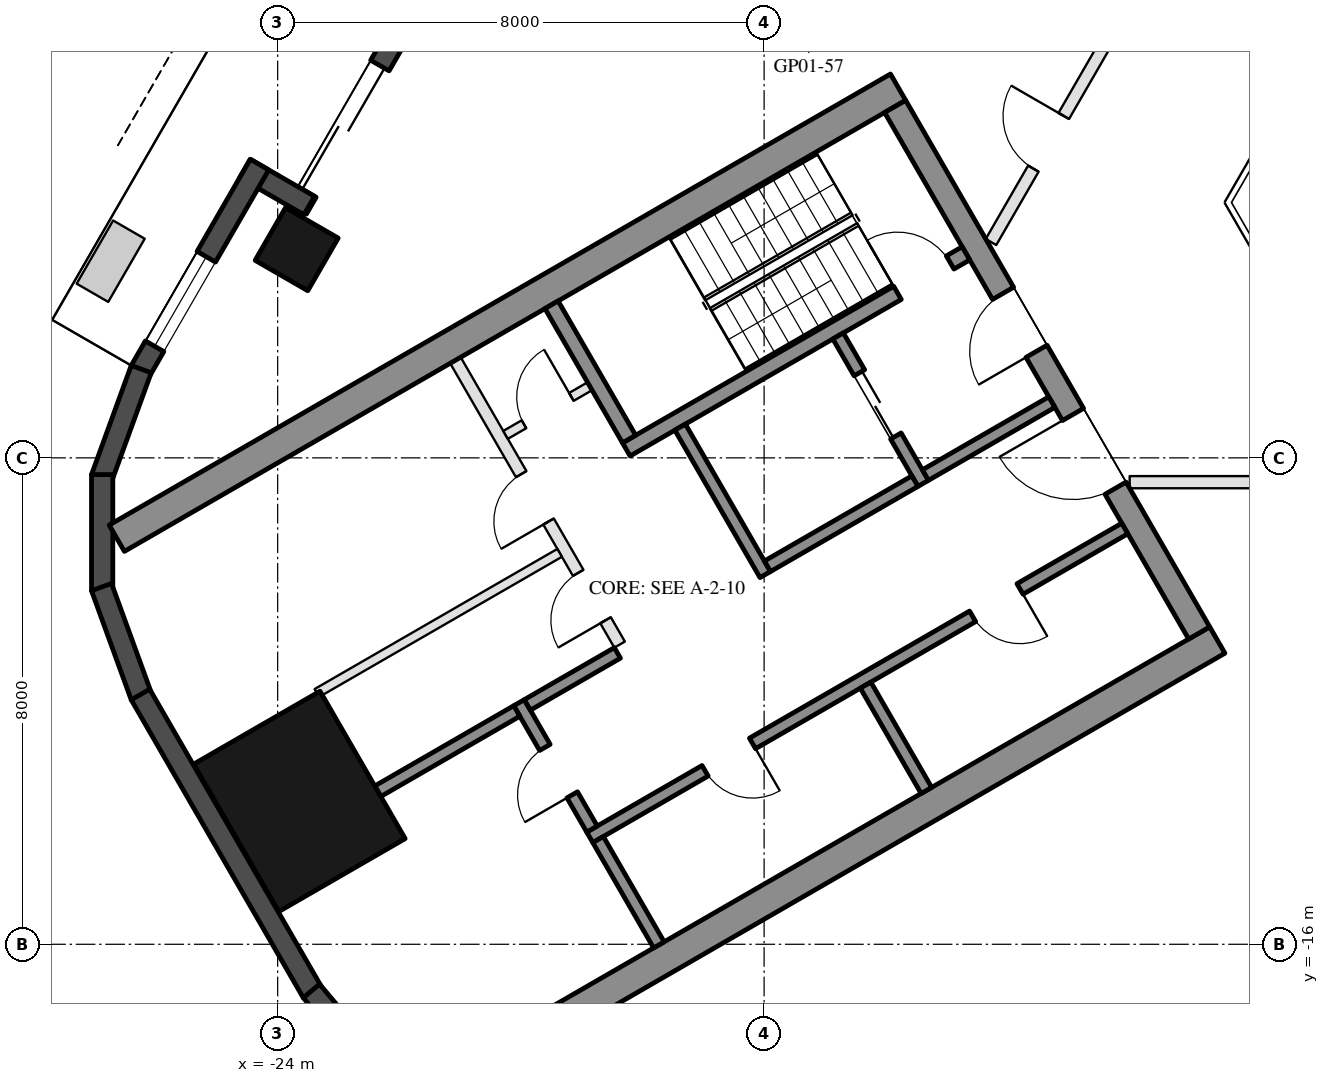
"""IFC4 building model, lengths in metres.
Left out: names, types, materials, properties, quantities, classifications, styles, units other than length and angle.
Written with IfcOpenShell. Run it as: python <this file> out.ifc"""

import sys

from ifc_helpers import new_model, si_unit, direction, frame, frame_2d, origin, origin_2d, place, context, subcontext, project, spatial, rectangle, hollow_rectangle, extrude, element, fill, save


model = new_model("IFC4")
c1 = context("Model", 3, precision=1e-05, world=origin(), true_north=direction((0.0, 1.0)))
c2 = subcontext(c1, "Body", "Model", "MODEL_VIEW")
j1 = project(units=[si_unit("LENGTHUNIT", "METRE"), si_unit("PLANEANGLEUNIT", "RADIAN")], contexts=[c1])
p1 = place(None, origin())
s1 = spatial("IfcSite", under=j1, at=p1, CompositionType="ELEMENT")
p2 = place(p1, origin())
s2 = spatial("IfcBuilding", under=s1, at=p2, CompositionType="ELEMENT")
p3 = place(p2, frame((0.0, 0.0, 50.2)))
s3 = spatial("IfcBuildingStorey", under=s2, at=p3, CompositionType="ELEMENT", Elevation=50.2)
p4 = place(p3, frame((-23.688, -4.568, 0.0), z_axis=(0.0, 0.0, 1.0), x_axis=(0.5, 0.866025403784, 0.0)))
e1 = element("IfcColumn", 1, at=p4, inside=s3, PredefinedType="COLUMN", context=c2, shape_type="SweptSolid", body=[
    extrude(hollow_rectangle(XDim=1.0, YDim=1.0, WallThickness=0.045, at=origin_2d()), origin(), (0.0, 0.0, 1.0), 3.7),
])
p5 = place(p3, frame((-23.643, -13.65, 0.0), z_axis=(0.0, 0.0, 1.0), x_axis=(-0.5, 0.866025403784, 0.0)))
e2 = element("IfcColumn", 2, at=p5, inside=s3, PredefinedType="COLUMN", context=c2, shape_type="SweptSolid", body=[
    extrude(hollow_rectangle(XDim=2.8, YDim=2.4, WallThickness=0.07, at=origin_2d()), origin(), (0.0, 0.0, 1.0), 3.7),
])
p6 = place(p3, frame((-20.309, 1.934, 0.0), z_axis=(0.0, 0.0, 1.0), x_axis=(-0.499992114976, -0.866029956157, 0.0)))
e3 = element("IfcWall", 3, at=p6, inside=s3, PredefinedType="SOLIDWALL", context=c2, shape_type="SweptSolid", body=[
    extrude(rectangle(XDim=6.74, YDim=0.35, at=frame_2d((3.37, 0.0))), origin(), (0.0, 0.0, 1.0), 3.55),
])
p7 = place(p6, frame((4.02, 0.0, 0.0)))
e4 = element("IfcOpeningElement", 4, at=p7, cuts=e3, PredefinedType="OPENING", context=c2, shape_type="SweptSolid", body=[
    extrude(rectangle(XDim=2.4, YDim=2.4, at=frame_2d((1.2, 1.2))), frame((0.0, 0.185, 0.0), z_axis=(0.0, -1.0, 0.0), x_axis=(1.0, 0.0, 0.0)), (0.0, 0.0, 1.0), 0.37),
])
p8 = place(p6, frame((0.32, 0.0, 0.3)))
e5 = element("IfcOpeningElement", 5, at=p8, cuts=e3, PredefinedType="OPENING", context=c2, shape_type="SweptSolid", body=[
    extrude(rectangle(XDim=1.5, YDim=2.65, at=frame_2d((0.75, 1.325))), frame((0.0, 0.185, 0.0), z_axis=(0.0, -1.0, 0.0), x_axis=(1.0, 0.0, 0.0)), (0.0, 0.0, 1.0), 0.37),
])
p9 = place(p6, frame((2.12, 0.0, 0.3)))
e6 = element("IfcOpeningElement", 6, at=p9, cuts=e3, PredefinedType="OPENING", context=c2, shape_type="SweptSolid", body=[
    extrude(rectangle(XDim=1.5, YDim=2.65, at=frame_2d((0.75, 1.325))), frame((0.0, 0.185, 0.0), z_axis=(0.0, -1.0, 0.0), x_axis=(1.0, 0.0, 0.0)), (0.0, 0.0, 1.0), 0.37),
])
p10 = place(p3, frame((-23.481, -3.85, 0.0), z_axis=(0.0, 0.0, 1.0), x_axis=(-0.866092288191, 0.499884134912, 0.0)))
e7 = element("IfcWall", 7, at=p10, inside=s3, PredefinedType="SOLIDWALL", context=c2, shape_type="SweptSolid", body=[
    extrude(rectangle(XDim=1.22, YDim=0.35, at=frame_2d((0.61, 0.0))), origin(), (0.0, 0.0, 1.0), 3.55),
])
p11 = place(p3, frame((-24.299, -3.176, 0.0), z_axis=(0.0, 0.0, 1.0), x_axis=(-0.500028278809, -0.866009076391, 0.0)))
e8 = element("IfcWall", 8, at=p11, inside=s3, PredefinedType="SOLIDWALL", context=c2, shape_type="SweptSolid", body=[
    extrude(rectangle(XDim=3.916, YDim=0.35, at=frame_2d((1.958, 0.0))), origin(), (0.0, 0.0, 1.0), 3.55),
])
p12 = place(p11, frame((1.75, 0.0, 0.3)))
e9 = element("IfcOpeningElement", 9, at=p12, cuts=e8, PredefinedType="OPENING", context=c2, shape_type="SweptSolid", body=[
    extrude(rectangle(XDim=1.7, YDim=2.65, at=frame_2d((0.85, 1.325))), frame((0.0, 0.185, 0.0), z_axis=(0.0, -1.0, 0.0), x_axis=(1.0, 0.0, 0.0)), (0.0, 0.0, 1.0), 0.37),
])
for number, where, z_axis, x_axis in (
    (10, (-26.244, -6.54, 0.0), (0.0, 0.0, 1.0), (-0.342, -0.94, 0.0)),
    (11, (-26.886, -8.275, 0.0), (0.0, 0.0, 1.0), (0.0, -1.0, 0.0)),
    (12, (-26.897, -10.125, 0.0), (0.0, 0.0, 1.0), (0.342, -0.94, 0.0)),
):
    element("IfcWall", number, at=place(p3, frame(where, z_axis=z_axis, x_axis=x_axis)), inside=s3, PredefinedType="SOLIDWALL", context=c2, shape_type="SweptSolid", body=[
        extrude(rectangle(XDim=1.91, YDim=0.35, at=frame_2d((0.955, 0.0))), origin(), (0.0, 0.0, 1.0), 3.55),
    ])
p13 = place(p3, frame((-26.257, -11.893, 0.0), z_axis=(0.0, 0.0, 1.0), x_axis=(0.500018773155, -0.866014564827, 0.0)))
e13 = element("IfcWall", 13, at=p13, inside=s3, PredefinedType="SOLIDWALL", context=c2, shape_type="SweptSolid", body=[
    extrude(rectangle(XDim=5.658, YDim=0.35, at=frame_2d((2.829, 0.0))), origin(), (0.0, 0.0, 1.0), 3.55),
])
p14 = place(p3, frame((-23.445, -16.768, 0.0), z_axis=(0.0, 0.0, 1.0), x_axis=(0.642733291068, -0.76609001857, 0.0)))
e14 = element("IfcWall", 14, at=p14, inside=s3, PredefinedType="SOLIDWALL", context=c2, shape_type="SweptSolid", body=[
    extrude(rectangle(XDim=1.91, YDim=0.35, at=frame_2d((0.955, 0.0))), origin(), (0.0, 0.0, 1.0), 3.55),
])
for number, where, z_axis, x_axis in (
    (15, (-13.797, -1.903, 0.0), (0.0, 0.0, 1.0), (-0.866, -0.5, 0.0)),
    (16, (-8.547, -10.997, 0.0), (0.0, 0.0, 1.0), (-0.866, -0.5, 0.0)),
):
    element("IfcWall", number, at=place(p3, frame(where, z_axis=z_axis, x_axis=x_axis)), inside=s3, PredefinedType="SHEAR", context=c2, shape_type="SweptSolid", body=[
        extrude(rectangle(XDim=14.837, YDim=0.5, at=frame_2d((7.418, 0.0))), origin(), (0.0, 0.0, 1.0), 3.5),
    ])
p15 = place(p3, frame((-13.845, -2.22, 0.0), z_axis=(0.0, 0.0, 1.0), x_axis=(0.500004234368, -0.866022959057, 0.0)))
e17 = element("IfcWall", 17, at=p15, inside=s3, PredefinedType="SHEAR", context=c2, shape_type="SweptSolid", body=[
    extrude(rectangle(XDim=10.0, YDim=0.4, at=frame_2d((5.0, 0.0))), origin(), (0.0, 0.0, 1.0), 3.5),
])
p16 = place(p15, frame((3.55, 0.0, 0.0)))
e18 = element("IfcOpeningElement", 18, at=p16, cuts=e17, PredefinedType="OPENING", context=c2, shape_type="SweptSolid", body=[
    extrude(rectangle(XDim=1.1, YDim=2.1, at=frame_2d((0.55, 1.05))), frame((0.0, 0.21, 0.0), z_axis=(0.0, -1.0, 0.0), x_axis=(1.0, 0.0, 0.0)), (0.0, 0.0, 1.0), 0.42),
])
p17 = place(p15, frame((5.85, 0.0, 0.0)))
e19 = element("IfcOpeningElement", 19, at=p17, cuts=e17, PredefinedType="OPENING", context=c2, shape_type="SweptSolid", body=[
    extrude(rectangle(XDim=1.4, YDim=2.1, at=frame_2d((0.7, 1.05))), frame((0.0, 0.21, 0.0), z_axis=(0.0, -1.0, 0.0), x_axis=(1.0, 0.0, 0.0)), (0.0, 0.0, 1.0), 0.42),
])
p18 = place(p3, frame((-12.681, -4.636, 0.0), z_axis=(0.0, 0.0, 1.0), x_axis=(-0.866021702275, -0.500006411147, 0.0)))
e20 = element("IfcWall", 20, at=p18, inside=s3, PredefinedType="SHEAR", context=c2, shape_type="SweptSolid", body=[
    extrude(rectangle(XDim=6.45, YDim=0.25, at=frame_2d((3.225, 0.0))), origin(), (0.0, 0.0, 1.0), 3.5),
])
p19 = place(p18, frame((0.3, 0.0, 0.0)))
e21 = element("IfcOpeningElement", 21, at=p19, cuts=e20, PredefinedType="OPENING", context=c2, shape_type="SweptSolid", body=[
    extrude(rectangle(XDim=1.0, YDim=2.1, at=frame_2d((0.5, 1.05))), frame((0.0, 0.135, 0.0), z_axis=(0.0, -1.0, 0.0), x_axis=(1.0, 0.0, 0.0)), (0.0, 0.0, 1.0), 0.27),
])
p20 = place(p3, frame((-19.496, -5.482, 0.0), z_axis=(0.0, 0.0, 1.0), x_axis=(0.499990435942, -0.866030925526, 0.0)))
e22 = element("IfcWall", 22, at=p20, inside=s3, PredefinedType="SHEAR", context=c2, shape_type="SweptSolid", body=[
    extrude(rectangle(XDim=2.55, YDim=0.25, at=frame_2d((1.275, 0.0))), origin(), (0.0, 0.0, 1.0), 3.5),
])
p21 = place(p3, frame((-17.381, -7.495, 0.0), z_axis=(0.0, 0.0, 1.0), x_axis=(0.500011755427, -0.866018616679, 0.0)))
e23 = element("IfcWall", 23, at=p21, inside=s3, PredefinedType="SHEAR", context=c2, shape_type="SweptSolid", body=[
    extrude(rectangle(XDim=2.8, YDim=0.2, at=frame_2d((1.4, 0.0))), origin(), (0.0, 0.0, 1.0), 3.5),
])
p22 = place(p3, frame((-14.783, -5.995, 0.0), z_axis=(0.0, 0.0, 1.0), x_axis=(0.49994636267, -0.866056369097, 0.0)))
e24 = element("IfcWall", 24, at=p22, inside=s3, PredefinedType="SHEAR", context=c2, shape_type="SweptSolid", body=[
    extrude(rectangle(XDim=2.8, YDim=0.2, at=frame_2d((1.4, 0.0))), origin(), (0.0, 0.0, 1.0), 3.5),
])
p23 = place(p22, frame((0.7, 0.0, 0.0)))
e25 = element("IfcOpeningElement", 25, at=p23, cuts=e24, PredefinedType="OPENING", context=c2, shape_type="SweptSolid", body=[
    extrude(rectangle(XDim=1.2, YDim=2.1, at=frame_2d((0.6, 1.05))), frame((0.0, 0.11, 0.0), z_axis=(0.0, -1.0, 0.0), x_axis=(1.0, 0.0, 0.0)), (0.0, 0.0, 1.0), 0.22),
])
p24 = place(p3, frame((-13.52, -8.383, 0.0), z_axis=(0.0, 0.0, 1.0), x_axis=(-0.866034573852, -0.49998411664, 0.0)))
e26 = element("IfcWall", 26, at=p24, inside=s3, PredefinedType="SHEAR", context=c2, shape_type="SweptSolid", body=[
    extrude(rectangle(XDim=2.8, YDim=0.2, at=frame_2d((1.4, 0.0))), origin(), (0.0, 0.0, 1.0), 3.5),
])
p25 = place(p3, frame((-11.268, -7.083, 0.0), z_axis=(0.0, 0.0, 1.0), x_axis=(-0.866050077142, -0.499957262057, 0.0)))
e27 = element("IfcWall", 27, at=p25, inside=s3, PredefinedType="SHEAR", context=c2, shape_type="SweptSolid", body=[
    extrude(rectangle(XDim=2.4, YDim=0.2, at=frame_2d((1.2, 0.0))), origin(), (0.0, 0.0, 1.0), 3.5),
])
p26 = place(p3, frame((-10.068, -9.162, 0.0), z_axis=(0.0, 0.0, 1.0), x_axis=(-0.866032725843, -0.499987317609, 0.0)))
e28 = element("IfcWall", 28, at=p26, inside=s3, PredefinedType="SHEAR", context=c2, shape_type="SweptSolid", body=[
    extrude(rectangle(XDim=10.16, YDim=0.2, at=frame_2d((5.08, 0.0))), origin(), (0.0, 0.0, 1.0), 3.5),
])
p27 = place(p26, frame((1.99, 0.0, 0.0)))
e29 = element("IfcOpeningElement", 29, at=p27, cuts=e28, PredefinedType="OPENING", context=c2, shape_type="SweptSolid", body=[
    extrude(rectangle(XDim=0.9, YDim=2.1, at=frame_2d((0.45, 1.05))), frame((0.0, 0.11, 0.0), z_axis=(0.0, -1.0, 0.0), x_axis=(1.0, 0.0, 0.0)), (0.0, 0.0, 1.0), 0.22),
])
p28 = place(p26, frame((7.07, 0.0, 0.0)))
e30 = element("IfcOpeningElement", 30, at=p28, cuts=e28, PredefinedType="OPENING", context=c2, shape_type="SweptSolid", body=[
    extrude(rectangle(XDim=0.9, YDim=2.1, at=frame_2d((0.45, 1.05))), frame((0.0, 0.11, 0.0), z_axis=(0.0, -1.0, 0.0), x_axis=(1.0, 0.0, 0.0)), (0.0, 0.0, 1.0), 0.22),
])
p29 = place(p3, frame((-20.031, -12.026, 0.0), z_axis=(0.0, 0.0, 1.0), x_axis=(0.500033551112, -0.866006032174, 0.0)))
e31 = element("IfcWall", 31, at=p29, inside=s3, PredefinedType="SHEAR", context=c2, shape_type="SweptSolid", body=[
    extrude(rectangle(XDim=2.4, YDim=0.2, at=frame_2d((1.2, 0.0))), origin(), (0.0, 0.0, 1.0), 3.5),
])
p30 = place(p29, frame((0.85, 0.0, 0.0)))
e32 = element("IfcOpeningElement", 32, at=p30, cuts=e31, PredefinedType="OPENING", context=c2, shape_type="SweptSolid", body=[
    extrude(rectangle(XDim=0.9, YDim=2.1, at=frame_2d((0.45, 1.05))), frame((0.0, 0.11, 0.0), z_axis=(0.0, -1.0, 0.0), x_axis=(1.0, 0.0, 0.0)), (0.0, 0.0, 1.0), 0.22),
])
p31 = place(p3, frame((-18.413, -11.208, 0.0), z_axis=(0.0, 0.0, 1.0), x_axis=(-0.866038183914, -0.499977863513, 0.0)))
e33 = element("IfcWall", 33, at=p31, inside=s3, PredefinedType="SHEAR", context=c2, shape_type="SweptSolid", body=[
    extrude(rectangle(XDim=1.71, YDim=0.2, at=frame_2d((0.855, 0.0))), origin(), (0.0, 0.0, 1.0), 3.5),
])
for number, where, z_axis, x_axis in (
    (34, (-14.331, -11.738, 0.0), (0.0, 0.0, 1.0), (0.5, -0.866, 0.0)),
    (35, (-18.73, -14.278, 0.0), (0.0, 0.0, 1.0), (0.5, -0.866, 0.0)),
):
    element("IfcWall", number, at=place(p3, frame(where, z_axis=z_axis, x_axis=x_axis)), inside=s3, PredefinedType="SHEAR", context=c2, shape_type="SweptSolid", body=[
        extrude(rectangle(XDim=2.0, YDim=0.2, at=frame_2d((1.0, 0.0))), origin(), (0.0, 0.0, 1.0), 3.5),
    ])
p32 = place(p3, frame((-20.067, -12.163, 0.0), z_axis=(0.0, 0.0, 1.0), x_axis=(-0.866060851709, -0.499938597367, 0.0)))
e36 = element("IfcWall", 36, at=p32, inside=s3, PredefinedType="SHEAR", context=c2, shape_type="SweptSolid", body=[
    extrude(rectangle(XDim=2.64, YDim=0.2, at=frame_2d((1.32, 0.0))), origin(), (0.0, 0.0, 1.0), 3.5),
])
p33 = place(p3, frame((-21.076, -6.395, 0.0), z_axis=(0.0, 0.0, 1.0), x_axis=(0.50001468107, -0.866016927499, 0.0)))
e37 = element("IfcWall", 37, at=p33, inside=s3, PredefinedType="PARTITIONING", context=c2, shape_type="SweptSolid", body=[
    extrude(rectangle(XDim=5.4, YDim=0.2, at=frame_2d((2.7, 0.0))), origin(), (0.0, 0.0, 1.0), 3.5),
])
p34 = place(p33, frame((2.163, 0.0, 0.0)))
e38 = element("IfcOpeningElement", 38, at=p34, cuts=e37, PredefinedType="OPENING", context=c2, shape_type="SweptSolid", body=[
    extrude(rectangle(XDim=0.9, YDim=2.1, at=frame_2d((0.45, 1.05))), frame((0.0, 0.11, 0.0), z_axis=(0.0, -1.0, 0.0), x_axis=(1.0, 0.0, 0.0)), (0.0, 0.0, 1.0), 0.22),
])
p35 = place(p33, frame((4.038, 0.0, 0.0)))
e39 = element("IfcOpeningElement", 39, at=p35, cuts=e37, PredefinedType="OPENING", context=c2, shape_type="SweptSolid", body=[
    extrude(rectangle(XDim=0.9, YDim=2.1, at=frame_2d((0.45, 1.05))), frame((0.0, 0.11, 0.0), z_axis=(0.0, -1.0, 0.0), x_axis=(1.0, 0.0, 0.0)), (0.0, 0.0, 1.0), 0.22),
])
p36 = place(p3, frame((-18.866, -6.822, 0.0), z_axis=(0.0, 0.0, 1.0), x_axis=(-0.866028054938, -0.499995408039, 0.0)))
e40 = element("IfcWall", 40, at=p36, inside=s3, PredefinedType="PARTITIONING", context=c2, shape_type="SweptSolid", body=[
    extrude(rectangle(XDim=1.6, YDim=0.15, at=frame_2d((0.8, 0.0))), origin(), (0.0, 0.0, 1.0), 3.5),
])
p37 = place(p36, frame((0.35, 0.0, 0.0)))
e41 = element("IfcOpeningElement", 41, at=p37, cuts=e40, PredefinedType="OPENING", context=c2, shape_type="SweptSolid", body=[
    extrude(rectangle(XDim=0.9, YDim=2.1, at=frame_2d((0.45, 1.05))), frame((0.0, 0.085, 0.0), z_axis=(0.0, -1.0, 0.0), x_axis=(1.0, 0.0, 0.0)), (0.0, 0.0, 1.0), 0.17),
])
p38 = place(p3, frame((-19.363, -9.562, 0.0), z_axis=(0.0, 0.0, 1.0), x_axis=(-0.86601185002, -0.500023475074, 0.0)))
e42 = element("IfcWall", 42, at=p38, inside=s3, PredefinedType="PARTITIONING", context=c2, shape_type="SweptSolid", body=[
    extrude(rectangle(XDim=4.61, YDim=0.15, at=frame_2d((2.305, 0.0))), origin(), (0.0, 0.0, 1.0), 3.5),
])
p39 = place(p3, frame((-3.4, -8.4, 0.0), z_axis=(0.0, 0.0, 1.0), x_axis=(-1.0, 0.0, 0.0)))
e43 = element("IfcWall", 43, at=p39, inside=s3, PredefinedType="PARTITIONING", context=c2, shape_type="SweptSolid", body=[
    extrude(rectangle(XDim=6.588, YDim=0.2, at=frame_2d((3.294, 0.0))), origin(), (0.0, 0.0, 1.0), 2.95),
])
p40 = place(p39, frame((2.794, 0.0, 0.0)))
e44 = element("IfcOpeningElement", 44, at=p40, cuts=e43, PredefinedType="OPENING", context=c2, shape_type="SweptSolid", body=[
    extrude(rectangle(XDim=1.0, YDim=2.1, at=frame_2d((0.5, 1.05))), frame((0.0, 0.11, 0.0), z_axis=(0.0, -1.0, 0.0), x_axis=(1.0, 0.0, 0.0)), (0.0, 0.0, 1.0), 0.22),
])
p41 = place(p3, frame((-12.269, -4.45, 0.0), z_axis=(0.0, 0.0, 1.0), x_axis=(0.500055316652, 0.865993464345, 0.0)))
e45 = element("IfcWall", 45, at=p41, inside=s3, PredefinedType="PARTITIONING", context=c2, shape_type="SweptSolid", body=[
    extrude(rectangle(XDim=3.788, YDim=0.2, at=frame_2d((1.894, 0.0))), origin(), (0.0, 0.0, 1.0), 2.95),
])
p42 = place(p41, frame((1.394, 0.0, 0.0)))
e46 = element("IfcOpeningElement", 46, at=p42, cuts=e45, PredefinedType="OPENING", context=c2, shape_type="SweptSolid", body=[
    extrude(rectangle(XDim=1.0, YDim=2.1, at=frame_2d((0.5, 1.05))), frame((0.0, 0.11, 0.0), z_axis=(0.0, -1.0, 0.0), x_axis=(1.0, 0.0, 0.0)), (0.0, 0.0, 1.0), 0.22),
])
p43 = place(p7, frame((2.4, 0.0, 0.0), z_axis=(0.0, 0.0, 1.0), x_axis=(-1.0, 0.0, 0.0)))
e47 = element("IfcDoor", 47, at=p43, inside=s3, OperationType="SLIDING_TO_LEFT", PredefinedType="DOOR", context=c2, shape_type="SweptSolid", body=[
    extrude(rectangle(XDim=2.4, YDim=2.4, at=frame_2d((1.2, 1.2))), frame((0.0, 0.025, 0.0), z_axis=(0.0, -1.0, 0.0), x_axis=(1.0, 0.0, 0.0)), (0.0, 0.0, 1.0), 0.05),
])
fill(e4, e47)
p44 = place(p12, origin())
e48 = element("IfcWindow", 48, at=p44, inside=s3, PartitioningType="SINGLE_PANEL", PredefinedType="WINDOW", context=c2, shape_type="SweptSolid", body=[
    extrude(rectangle(XDim=1.7, YDim=2.65, at=frame_2d((0.85, 1.325))), frame((0.0, 0.03, 0.0), z_axis=(0.0, -1.0, 0.0), x_axis=(1.0, 0.0, 0.0)), (0.0, 0.0, 1.0), 0.06),
])
fill(e9, e48)
p45 = place(p23, origin())
e49 = element("IfcDoor", 49, at=p45, inside=s3, OperationType="DOUBLE_DOOR_SLIDING", PredefinedType="DOOR", context=c2, shape_type="SweptSolid", body=[
    extrude(rectangle(XDim=1.2, YDim=2.1, at=frame_2d((0.6, 1.05))), frame((0.0, 0.025, 0.0), z_axis=(0.0, -1.0, 0.0), x_axis=(1.0, 0.0, 0.0)), (0.0, 0.0, 1.0), 0.05),
])
fill(e25, e49)
p46 = place(p37, frame((0.9, 0.0, 0.0), z_axis=(0.0, 0.0, 1.0), x_axis=(-1.0, 0.0, 0.0)))
e50 = element("IfcDoor", 50, at=p46, inside=s3, OperationType="SINGLE_SWING_RIGHT", PredefinedType="DOOR", context=c2, shape_type="SweptSolid", body=[
    extrude(rectangle(XDim=0.9, YDim=2.1, at=frame_2d((0.45, 1.05))), frame((0.0, 0.025, 0.0), z_axis=(0.0, -1.0, 0.0), x_axis=(1.0, 0.0, 0.0)), (0.0, 0.0, 1.0), 0.05),
])
fill(e41, e50)
p47 = place(p27, origin())
e51 = element("IfcDoor", 51, at=p47, inside=s3, OperationType="SINGLE_SWING_LEFT", PredefinedType="DOOR", context=c2, shape_type="SweptSolid", body=[
    extrude(rectangle(XDim=0.9, YDim=2.1, at=frame_2d((0.45, 1.05))), frame((0.0, 0.025, 0.0), z_axis=(0.0, -1.0, 0.0), x_axis=(1.0, 0.0, 0.0)), (0.0, 0.0, 1.0), 0.05),
])
fill(e29, e51)
p48 = place(p28, origin())
e52 = element("IfcDoor", 52, at=p48, inside=s3, OperationType="SINGLE_SWING_LEFT", PredefinedType="DOOR", context=c2, shape_type="SweptSolid", body=[
    extrude(rectangle(XDim=0.9, YDim=2.1, at=frame_2d((0.45, 1.05))), frame((0.0, 0.025, 0.0), z_axis=(0.0, -1.0, 0.0), x_axis=(1.0, 0.0, 0.0)), (0.0, 0.0, 1.0), 0.05),
])
fill(e30, e52)
p49 = place(p30, frame((0.9, 0.0, 0.0), z_axis=(0.0, 0.0, 1.0), x_axis=(-1.0, 0.0, 0.0)))
e53 = element("IfcDoor", 53, at=p49, inside=s3, OperationType="SINGLE_SWING_LEFT", PredefinedType="DOOR", context=c2, shape_type="SweptSolid", body=[
    extrude(rectangle(XDim=0.9, YDim=2.1, at=frame_2d((0.45, 1.05))), frame((0.0, 0.025, 0.0), z_axis=(0.0, -1.0, 0.0), x_axis=(1.0, 0.0, 0.0)), (0.0, 0.0, 1.0), 0.05),
])
fill(e32, e53)
p50 = place(p34, frame((0.9, 0.0, 0.0), z_axis=(0.0, 0.0, 1.0), x_axis=(-1.0, 0.0, 0.0)))
e54 = element("IfcDoor", 54, at=p50, inside=s3, OperationType="SINGLE_SWING_LEFT", PredefinedType="DOOR", context=c2, shape_type="SweptSolid", body=[
    extrude(rectangle(XDim=0.9, YDim=2.1, at=frame_2d((0.45, 1.05))), frame((0.0, 0.025, 0.0), z_axis=(0.0, -1.0, 0.0), x_axis=(1.0, 0.0, 0.0)), (0.0, 0.0, 1.0), 0.05),
])
fill(e38, e54)
p51 = place(p35, frame((0.9, 0.0, 0.0), z_axis=(0.0, 0.0, 1.0), x_axis=(-1.0, 0.0, 0.0)))
e55 = element("IfcDoor", 55, at=p51, inside=s3, OperationType="SINGLE_SWING_LEFT", PredefinedType="DOOR", context=c2, shape_type="SweptSolid", body=[
    extrude(rectangle(XDim=0.9, YDim=2.1, at=frame_2d((0.45, 1.05))), frame((0.0, 0.025, 0.0), z_axis=(0.0, -1.0, 0.0), x_axis=(1.0, 0.0, 0.0)), (0.0, 0.0, 1.0), 0.05),
])
fill(e39, e55)
p52 = place(p16, frame((1.1, 0.0, 0.0), z_axis=(0.0, 0.0, 1.0), x_axis=(-1.0, 0.0, 0.0)))
e56 = element("IfcDoor", 56, at=p52, inside=s3, OperationType="SINGLE_SWING_LEFT", PredefinedType="DOOR", context=c2, shape_type="SweptSolid", body=[
    extrude(rectangle(XDim=1.1, YDim=2.1, at=frame_2d((0.55, 1.05))), frame((0.0, 0.025, 0.0), z_axis=(0.0, -1.0, 0.0), x_axis=(1.0, 0.0, 0.0)), (0.0, 0.0, 1.0), 0.05),
])
fill(e18, e56)
p53 = place(p17, frame((1.4, 0.0, 0.0), z_axis=(0.0, 0.0, 1.0), x_axis=(-1.0, 0.0, 0.0)))
e57 = element("IfcDoor", 57, at=p53, inside=s3, OperationType="DOUBLE_DOOR_SINGLE_SWING", PredefinedType="DOOR", context=c2, shape_type="SweptSolid", body=[
    extrude(rectangle(XDim=1.4, YDim=2.1, at=frame_2d((0.7, 1.05))), frame((0.0, 0.025, 0.0), z_axis=(0.0, -1.0, 0.0), x_axis=(1.0, 0.0, 0.0)), (0.0, 0.0, 1.0), 0.05),
])
fill(e19, e57)
p54 = place(p19, frame((1.0, 0.0, 0.0), z_axis=(0.0, 0.0, 1.0), x_axis=(-1.0, 0.0, 0.0)))
e58 = element("IfcDoor", 58, at=p54, inside=s3, OperationType="SINGLE_SWING_LEFT", PredefinedType="DOOR", context=c2, shape_type="SweptSolid", body=[
    extrude(rectangle(XDim=1.0, YDim=2.1, at=frame_2d((0.5, 1.05))), frame((0.0, 0.025, 0.0), z_axis=(0.0, -1.0, 0.0), x_axis=(1.0, 0.0, 0.0)), (0.0, 0.0, 1.0), 0.05),
])
fill(e21, e58)
p55 = place(p42, origin())
e59 = element("IfcDoor", 59, at=p55, inside=s3, OperationType="SINGLE_SWING_RIGHT", PredefinedType="DOOR", context=c2, shape_type="SweptSolid", body=[
    extrude(rectangle(XDim=1.0, YDim=2.1, at=frame_2d((0.5, 1.05))), frame((0.0, 0.025, 0.0), z_axis=(0.0, -1.0, 0.0), x_axis=(1.0, 0.0, 0.0)), (0.0, 0.0, 1.0), 0.05),
])
fill(e46, e59)
save(model, sys.argv[1])
